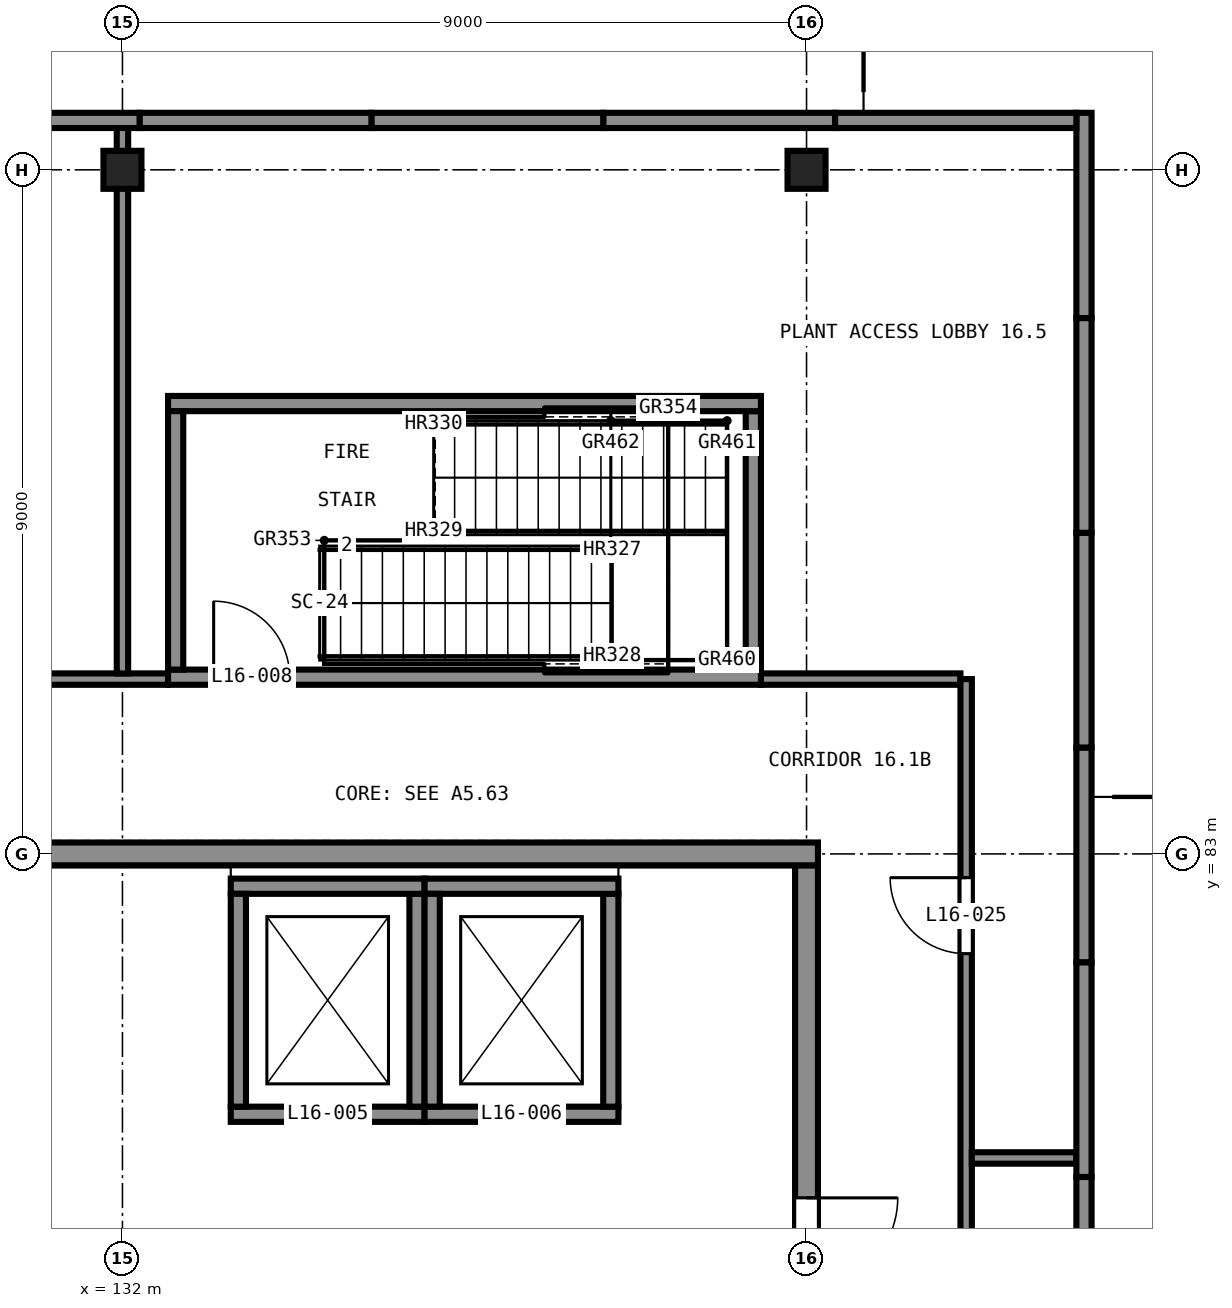
"""IFC4 building model, lengths in metres.
Left out: names, types, materials, properties, quantities, classifications, styles, units other than length and angle.
Written with IfcOpenShell. Run it as: python <this file> out.ifc"""

import sys

from ifc_helpers import new_model, si_unit, direction, frame, frame_2d, origin, origin_2d, place, context, subcontext, project, spatial, polyline, rectangle, outline, extrude, element, fill, save


model = new_model("IFC4")
c1 = context("Model", 3, precision=1e-05, world=origin(), true_north=direction((0.0, 1.0)))
c2 = subcontext(c1, "Body", "Model", "MODEL_VIEW")
j1 = project(units=[si_unit("LENGTHUNIT", "METRE"), si_unit("PLANEANGLEUNIT", "RADIAN")], contexts=[c1])
p1 = place(None, origin())
s1 = spatial("IfcSite", under=j1, at=p1, CompositionType="ELEMENT")
p2 = place(p1, origin())
s2 = spatial("IfcBuilding", under=s1, at=p2, CompositionType="ELEMENT")
p3 = place(p2, frame((0.0, 0.0, 65.5)))
s3 = spatial("IfcBuildingStorey", under=s2, at=p3, CompositionType="ELEMENT", Elevation=65.5)
for number, where, z_axis, x_axis in (
    (1, (132.0, 92.0, 0.0), (0.0, 0.0, 1.0), (1.0, 0.0, 0.0)),
    (2, (141.0, 92.0, 0.0), (0.0, 0.0, 1.0), (1.0, 0.0, 0.0)),
):
    element("IfcColumn", number, at=place(p3, frame(where, z_axis=z_axis, x_axis=x_axis)), inside=s3, PredefinedType="COLUMN", context=c2, shape_type="SweptSolid", body=[
        extrude(rectangle(XDim=0.5, YDim=0.5, at=origin_2d()), origin(), (0.0, 0.0, 1.0), 4.7),
    ])
p4 = place(p3, frame((141.0, 65.15, 0.0), z_axis=(0.0, 0.0, 1.0), x_axis=(0.0, 1.0, 0.0)))
e3 = element("IfcWall", 3, at=p4, inside=s3, PredefinedType="SHEAR", context=c2, shape_type="SweptSolid", body=[
    extrude(rectangle(XDim=17.7, YDim=0.3, at=frame_2d((8.85, 0.0))), origin(), (0.0, 0.0, 1.0), 4.7),
])
p5 = place(p4, frame((4.375, 0.0, 0.0)))
e4 = element("IfcOpeningElement", 4, at=p5, cuts=e3, PredefinedType="OPENING", context=c2, shape_type="SweptSolid", body=[
    extrude(rectangle(XDim=1.2, YDim=2.1, at=frame_2d((0.6, 1.05))), frame((0.0, 0.16, 0.0), z_axis=(0.0, -1.0, 0.0), x_axis=(1.0, 0.0, 0.0)), (0.0, 0.0, 1.0), 0.32),
])
p6 = place(p4, frame((12.125, 0.0, 0.0)))
e5 = element("IfcOpeningElement", 5, at=p6, cuts=e3, PredefinedType="OPENING", context=c2, shape_type="SweptSolid", body=[
    extrude(rectangle(XDim=1.2, YDim=2.1, at=frame_2d((0.6, 1.05))), frame((0.0, 0.16, 0.0), z_axis=(0.0, -1.0, 0.0), x_axis=(1.0, 0.0, 0.0)), (0.0, 0.0, 1.0), 0.32),
])
p7 = place(p3, frame((141.15, 83.0, 0.0), z_axis=(0.0, 0.0, 1.0), x_axis=(-1.0, 0.0, 0.0)))
e6 = element("IfcWall", 6, at=p7, inside=s3, PredefinedType="SHEAR", context=c2, shape_type="SweptSolid", body=[
    extrude(rectangle(XDim=18.3, YDim=0.3, at=frame_2d((9.15, 0.0))), origin(), (0.0, 0.0, 1.0), 4.7),
])
p8 = place(p3, frame((144.65, 75.8, 0.0), z_axis=(0.0, 0.0, 1.0), x_axis=(0.0, 1.0, 0.0)))
e7 = element("IfcWall", 7, at=p8, inside=s3, PredefinedType="SOLIDWALL", context=c2, shape_type="SweptSolid", body=[
    extrude(rectangle(XDim=2.95, YDim=0.2, at=frame_2d((1.475, 0.0))), origin(), (0.0, 0.0, 1.0), 4.7),
])
for number, where, z_axis, x_axis in (
    (8, (144.65, 78.75, 0.0), (0.0, 0.0, 1.0), (0.0, 1.0, 0.0)),
    (9, (144.65, 81.575, 0.0), (0.0, 0.0, 1.0), (0.0, 1.0, 0.0)),
):
    element("IfcWall", number, at=place(p3, frame(where, z_axis=z_axis, x_axis=x_axis)), inside=s3, PredefinedType="SOLIDWALL", context=c2, shape_type="SweptSolid", body=[
        extrude(rectangle(XDim=2.825, YDim=0.2, at=frame_2d((1.413, 0.0))), origin(), (0.0, 0.0, 1.0), 4.7),
    ])
p9 = place(p3, frame((144.65, 84.4, 0.0), z_axis=(0.0, 0.0, 1.0), x_axis=(0.0, 1.0, 0.0)))
e10 = element("IfcWall", 10, at=p9, inside=s3, PredefinedType="SOLIDWALL", context=c2, shape_type="SweptSolid", body=[
    extrude(rectangle(XDim=2.825, YDim=0.2, at=frame_2d((1.413, 0.0))), origin(), (0.0, 0.0, 1.0), 4.7),
])
p10 = place(p3, frame((144.65, 87.225, 0.0), z_axis=(0.0, 0.0, 1.0), x_axis=(0.0, 1.0, 0.0)))
e11 = element("IfcWall", 11, at=p10, inside=s3, PredefinedType="SOLIDWALL", context=c2, shape_type="SweptSolid", body=[
    extrude(rectangle(XDim=2.825, YDim=0.2, at=frame_2d((1.413, 0.0))), origin(), (0.0, 0.0, 1.0), 4.7),
])
p11 = place(p3, frame((144.65, 90.05, 0.0), z_axis=(0.0, 0.0, 1.0), x_axis=(0.0, 1.0, 0.0)))
e12 = element("IfcWall", 12, at=p11, inside=s3, PredefinedType="SOLIDWALL", context=c2, shape_type="SweptSolid", body=[
    extrude(rectangle(XDim=2.7, YDim=0.2, at=frame_2d((1.35, 0.0))), origin(), (0.0, 0.0, 1.0), 4.7),
])
p12 = place(p3, frame((144.55, 92.65, 0.0), z_axis=(0.0, 0.0, 1.0), x_axis=(-1.0, 0.0, 0.0)))
e13 = element("IfcWall", 13, at=p12, inside=s3, PredefinedType="SOLIDWALL", context=c2, shape_type="SweptSolid", body=[
    extrude(rectangle(XDim=3.175, YDim=0.2, at=frame_2d((1.587, 0.0))), origin(), (0.0, 0.0, 1.0), 4.7),
])
for number, where, z_axis, x_axis in (
    (14, (141.375, 92.65, 0.0), (0.0, 0.0, 1.0), (-1.0, 0.0, 0.0)),
    (15, (138.325, 92.65, 0.0), (0.0, 0.0, 1.0), (-1.0, 0.0, 0.0)),
):
    element("IfcWall", number, at=place(p3, frame(where, z_axis=z_axis, x_axis=x_axis)), inside=s3, PredefinedType="SOLIDWALL", context=c2, shape_type="SweptSolid", body=[
        extrude(rectangle(XDim=3.05, YDim=0.2, at=frame_2d((1.525, 0.0))), origin(), (0.0, 0.0, 1.0), 4.7),
    ])
p13 = place(p3, frame((135.275, 92.65, 0.0), z_axis=(0.0, 0.0, 1.0), x_axis=(-1.0, 0.0, 0.0)))
e16 = element("IfcWall", 16, at=p13, inside=s3, PredefinedType="SOLIDWALL", context=c2, shape_type="SweptSolid", body=[
    extrude(rectangle(XDim=3.05, YDim=0.2, at=frame_2d((1.525, 0.0))), origin(), (0.0, 0.0, 1.0), 4.7),
])
p14 = place(p3, frame((132.225, 92.65, 0.0), z_axis=(0.0, 0.0, 1.0), x_axis=(-1.0, 0.0, 0.0)))
e17 = element("IfcWall", 17, at=p14, inside=s3, PredefinedType="SOLIDWALL", context=c2, shape_type="SweptSolid", body=[
    extrude(rectangle(XDim=2.925, YDim=0.2, at=frame_2d((1.462, 0.0))), origin(), (0.0, 0.0, 1.0), 4.7),
])
p15 = place(p3, frame((133.425, 79.575, 0.0), z_axis=(0.0, 0.0, 1.0), x_axis=(1.0, 0.0, 0.0)))
e18 = element("IfcWall", 18, at=p15, inside=s3, PredefinedType="SHEAR", context=c2, shape_type="SweptSolid", body=[
    extrude(rectangle(XDim=2.55, YDim=0.2, at=frame_2d((1.275, 0.0))), origin(), (0.0, 0.0, 1.0), 4.7),
])
p16 = place(p15, frame((0.725, 0.0, 0.0)))
e19 = element("IfcOpeningElement", 19, at=p16, cuts=e18, PredefinedType="OPENING", context=c2, shape_type="SweptSolid", body=[
    extrude(rectangle(XDim=1.1, YDim=2.1, at=frame_2d((0.55, 1.05))), frame((0.0, 0.11, 0.0), z_axis=(0.0, -1.0, 0.0), x_axis=(1.0, 0.0, 0.0)), (0.0, 0.0, 1.0), 0.22),
])
p17 = place(p3, frame((135.875, 79.675, 0.0), z_axis=(0.0, 0.0, 1.0), x_axis=(0.0, 1.0, 0.0)))
e20 = element("IfcWall", 20, at=p17, inside=s3, PredefinedType="SHEAR", context=c2, shape_type="SweptSolid", body=[
    extrude(rectangle(XDim=2.8, YDim=0.2, at=frame_2d((1.4, 0.0))), origin(), (0.0, 0.0, 1.0), 4.7),
])
p18 = place(p3, frame((135.975, 82.575, 0.0), z_axis=(0.0, 0.0, 1.0), x_axis=(-1.0, 0.0, 0.0)))
e21 = element("IfcWall", 21, at=p18, inside=s3, PredefinedType="SHEAR", context=c2, shape_type="SweptSolid", body=[
    extrude(rectangle(XDim=2.55, YDim=0.2, at=frame_2d((1.275, 0.0))), origin(), (0.0, 0.0, 1.0), 4.7),
])
p19 = place(p3, frame((133.525, 82.475, 0.0), z_axis=(0.0, 0.0, 1.0), x_axis=(0.0, -1.0, 0.0)))
e22 = element("IfcWall", 22, at=p19, inside=s3, PredefinedType="SHEAR", context=c2, shape_type="SweptSolid", body=[
    extrude(rectangle(XDim=2.8, YDim=0.2, at=frame_2d((1.4, 0.0))), origin(), (0.0, 0.0, 1.0), 4.7),
])
p20 = place(p3, frame((135.975, 79.575, 0.0), z_axis=(0.0, 0.0, 1.0), x_axis=(1.0, 0.0, 0.0)))
e23 = element("IfcWall", 23, at=p20, inside=s3, PredefinedType="SHEAR", context=c2, shape_type="SweptSolid", body=[
    extrude(rectangle(XDim=2.55, YDim=0.2, at=frame_2d((1.275, 0.0))), origin(), (0.0, 0.0, 1.0), 4.7),
])
p21 = place(p20, frame((0.725, 0.0, 0.0)))
e24 = element("IfcOpeningElement", 24, at=p21, cuts=e23, PredefinedType="OPENING", context=c2, shape_type="SweptSolid", body=[
    extrude(rectangle(XDim=1.1, YDim=2.1, at=frame_2d((0.55, 1.05))), frame((0.0, 0.11, 0.0), z_axis=(0.0, -1.0, 0.0), x_axis=(1.0, 0.0, 0.0)), (0.0, 0.0, 1.0), 0.22),
])
p22 = place(p3, frame((138.425, 79.675, 0.0), z_axis=(0.0, 0.0, 1.0), x_axis=(0.0, 1.0, 0.0)))
e25 = element("IfcWall", 25, at=p22, inside=s3, PredefinedType="SHEAR", context=c2, shape_type="SweptSolid", body=[
    extrude(rectangle(XDim=2.8, YDim=0.2, at=frame_2d((1.4, 0.0))), origin(), (0.0, 0.0, 1.0), 4.7),
])
p23 = place(p3, frame((138.525, 82.575, 0.0), z_axis=(0.0, 0.0, 1.0), x_axis=(-1.0, 0.0, 0.0)))
e26 = element("IfcWall", 26, at=p23, inside=s3, PredefinedType="SHEAR", context=c2, shape_type="SweptSolid", body=[
    extrude(rectangle(XDim=2.55, YDim=0.2, at=frame_2d((1.275, 0.0))), origin(), (0.0, 0.0, 1.0), 4.7),
])
p24 = place(p3, frame((136.075, 82.475, 0.0), z_axis=(0.0, 0.0, 1.0), x_axis=(0.0, -1.0, 0.0)))
e27 = element("IfcWall", 27, at=p24, inside=s3, PredefinedType="SHEAR", context=c2, shape_type="SweptSolid", body=[
    extrude(rectangle(XDim=2.8, YDim=0.2, at=frame_2d((1.4, 0.0))), origin(), (0.0, 0.0, 1.0), 4.7),
])
p25 = place(p3, frame((132.6, 85.325, 0.0), z_axis=(0.0, 0.0, 1.0), x_axis=(1.0, 0.0, 0.0)))
e28 = element("IfcWall", 28, at=p25, inside=s3, PredefinedType="SHEAR", context=c2, shape_type="SweptSolid", body=[
    extrude(rectangle(XDim=7.8, YDim=0.2, at=frame_2d((3.9, 0.0))), origin(), (0.0, 0.0, 1.0), 4.7),
])
p26 = place(p25, frame((0.6, 0.0, 0.0)))
e29 = element("IfcOpeningElement", 29, at=p26, cuts=e28, PredefinedType="OPENING", context=c2, shape_type="SweptSolid", body=[
    extrude(rectangle(XDim=1.0, YDim=2.1, at=frame_2d((0.5, 1.05))), frame((0.0, 0.11, 0.0), z_axis=(0.0, -1.0, 0.0), x_axis=(1.0, 0.0, 0.0)), (0.0, 0.0, 1.0), 0.22),
])
p27 = place(p3, frame((140.3, 85.425, 0.0), z_axis=(0.0, 0.0, 1.0), x_axis=(0.0, 1.0, 0.0)))
e30 = element("IfcWall", 30, at=p27, inside=s3, PredefinedType="SHEAR", context=c2, shape_type="SweptSolid", body=[
    extrude(rectangle(XDim=3.4, YDim=0.2, at=frame_2d((1.7, 0.0))), origin(), (0.0, 0.0, 1.0), 4.7),
])
p28 = place(p3, frame((140.4, 88.925, 0.0), z_axis=(0.0, 0.0, 1.0), x_axis=(-1.0, 0.0, 0.0)))
e31 = element("IfcWall", 31, at=p28, inside=s3, PredefinedType="SHEAR", context=c2, shape_type="SweptSolid", body=[
    extrude(rectangle(XDim=7.8, YDim=0.2, at=frame_2d((3.9, 0.0))), origin(), (0.0, 0.0, 1.0), 4.7),
])
p29 = place(p3, frame((132.7, 88.825, 0.0), z_axis=(0.0, 0.0, 1.0), x_axis=(0.0, -1.0, 0.0)))
e32 = element("IfcWall", 32, at=p29, inside=s3, PredefinedType="SHEAR", context=c2, shape_type="SweptSolid", body=[
    extrude(rectangle(XDim=3.4, YDim=0.2, at=frame_2d((1.7, 0.0))), origin(), (0.0, 0.0, 1.0), 4.7),
])
p30 = place(p3, frame((132.6, 85.325, 5.0), z_axis=(0.0, 0.0, 1.0), x_axis=(1.0, 0.0, 0.0)))
e33 = element("IfcWall", 33, at=p30, inside=s3, PredefinedType="SHEAR", context=c2, shape_type="SweptSolid", body=[
    extrude(outline(polyline([(0.0, 0.0), (7.8, 0.0), (7.8, 3.591), (0.0, 3.591), (0.0, 0.0)])), frame((0.0, 0.1, 0.0), z_axis=(0.0, -1.0, 0.0), x_axis=(1.0, 0.0, 0.0)), (0.0, 0.0, 1.0), 0.2),
])
p31 = place(p3, frame((140.3, 85.425, 5.0), z_axis=(0.0, 0.0, 1.0), x_axis=(0.0, 1.0, 0.0)))
e34 = element("IfcWall", 34, at=p31, inside=s3, PredefinedType="SHEAR", context=c2, shape_type="SweptSolid", body=[
    extrude(outline(polyline([(0.0, 0.0), (3.4, 0.0), (3.4, 2.654), (0.0, 3.565), (0.0, 0.0)])), frame((0.0, 0.1, 0.0), z_axis=(0.0, -1.0, 0.0), x_axis=(1.0, 0.0, 0.0)), (0.0, 0.0, 1.0), 0.2),
])
p32 = place(p3, frame((140.4, 88.925, 5.0), z_axis=(0.0, 0.0, 1.0), x_axis=(-1.0, 0.0, 0.0)))
e35 = element("IfcWall", 35, at=p32, inside=s3, PredefinedType="SHEAR", context=c2, shape_type="SweptSolid", body=[
    extrude(outline(polyline([(0.0, 0.0), (7.8, 0.0), (7.8, 2.627), (0.0, 2.627), (0.0, 0.0)])), frame((0.0, 0.1, 0.0), z_axis=(0.0, -1.0, 0.0), x_axis=(1.0, 0.0, 0.0)), (0.0, 0.0, 1.0), 0.2),
])
p33 = place(p3, frame((132.7, 88.825, 5.0), z_axis=(0.0, 0.0, 1.0), x_axis=(0.0, -1.0, 0.0)))
e36 = element("IfcWall", 36, at=p33, inside=s3, PredefinedType="SHEAR", context=c2, shape_type="SweptSolid", body=[
    extrude(outline(polyline([(0.0, 0.0), (3.4, 0.0), (3.4, 3.565), (0.0, 2.654), (0.0, 0.0)])), frame((0.0, 0.1, 0.0), z_axis=(0.0, -1.0, 0.0), x_axis=(1.0, 0.0, 0.0)), (0.0, 0.0, 1.0), 0.2),
])
p34 = place(p33, frame((1.2, 0.0, 0.0)))
e37 = element("IfcOpeningElement", 37, at=p34, cuts=e36, PredefinedType="OPENING", context=c2, shape_type="SweptSolid", body=[
    extrude(rectangle(XDim=1.0, YDim=2.1, at=frame_2d((0.5, 1.05))), frame((0.0, 0.11, 0.0), z_axis=(0.0, -1.0, 0.0), x_axis=(1.0, 0.0, 0.0)), (0.0, 0.0, 1.0), 0.22),
])
p35 = place(p3, frame((122.7, 85.3, 0.0), z_axis=(0.0, 0.0, 1.0), x_axis=(1.0, 0.0, 0.0)))
e38 = element("IfcWall", 38, at=p35, inside=s3, PredefinedType="PARTITIONING", context=c2, shape_type="SweptSolid", body=[
    extrude(rectangle(XDim=9.9, YDim=0.15, at=frame_2d((4.95, 0.0))), origin(), (0.0, 0.0, 1.0), 4.7),
])
p36 = place(p3, frame((140.4, 85.3, 0.0), z_axis=(0.0, 0.0, 1.0), x_axis=(1.0, 0.0, 0.0)))
e39 = element("IfcWall", 39, at=p36, inside=s3, PredefinedType="PARTITIONING", context=c2, shape_type="SweptSolid", body=[
    extrude(rectangle(XDim=2.625, YDim=0.15, at=frame_2d((1.312, 0.0))), origin(), (0.0, 0.0, 1.0), 4.7),
])
p37 = place(p3, frame((143.1, 85.3, 0.0), z_axis=(0.0, 0.0, 1.0), x_axis=(0.0, -1.0, 0.0)))
e40 = element("IfcWall", 40, at=p37, inside=s3, PredefinedType="PARTITIONING", context=c2, shape_type="SweptSolid", body=[
    extrude(rectangle(XDim=22.6, YDim=0.15, at=frame_2d((11.3, 0.0))), origin(), (0.0, 0.0, 1.0), 4.7),
])
p38 = place(p37, frame((13.988, 0.0, 0.0)))
e41 = element("IfcOpeningElement", 41, at=p38, cuts=e40, PredefinedType="OPENING", context=c2, shape_type="SweptSolid", body=[
    extrude(rectangle(XDim=1.0, YDim=2.1, at=frame_2d((0.5, 1.05))), frame((0.0, 0.085, 0.0), z_axis=(0.0, -1.0, 0.0), x_axis=(1.0, 0.0, 0.0)), (0.0, 0.0, 1.0), 0.17),
])
p39 = place(p37, frame((2.613, 0.0, 0.0)))
e42 = element("IfcOpeningElement", 42, at=p39, cuts=e40, PredefinedType="OPENING", context=c2, shape_type="SweptSolid", body=[
    extrude(rectangle(XDim=1.0, YDim=2.1, at=frame_2d((0.5, 1.05))), frame((0.0, 0.085, 0.0), z_axis=(0.0, -1.0, 0.0), x_axis=(1.0, 0.0, 0.0)), (0.0, 0.0, 1.0), 0.17),
])
p40 = place(p3, frame((132.0, 85.374, 0.0), z_axis=(0.0, 0.0, 1.0), x_axis=(0.0, 1.0, 0.0)))
e43 = element("IfcWall", 43, at=p40, inside=s3, PredefinedType="PARTITIONING", context=c2, shape_type="SweptSolid", body=[
    extrude(rectangle(XDim=7.177, YDim=0.15, at=frame_2d((3.588, 0.0))), origin(), (0.0, 0.0, 1.0), 3.8),
])
p41 = place(p3, frame((143.174, 79.0, 0.0), z_axis=(0.0, 0.0, 1.0), x_axis=(1.0, 0.0, 0.0)))
e44 = element("IfcWall", 44, at=p41, inside=s3, PredefinedType="PARTITIONING", context=c2, shape_type="SweptSolid", body=[
    extrude(rectangle(XDim=1.377, YDim=0.15, at=frame_2d((0.688, 0.0))), origin(), (0.0, 0.0, 1.0), 4.7),
])
p42 = place(p16, origin())
e45 = element("IfcDoor", 45, at=p42, inside=s3, OperationType="SLIDING_TO_LEFT", PredefinedType="DOOR", context=c2, shape_type="SweptSolid", body=[
    extrude(rectangle(XDim=1.1, YDim=2.1, at=frame_2d((0.55, 1.05))), frame((0.0, 0.025, 0.0), z_axis=(0.0, -1.0, 0.0), x_axis=(1.0, 0.0, 0.0)), (0.0, 0.0, 1.0), 0.05),
])
fill(e19, e45)
p43 = place(p21, origin())
e46 = element("IfcDoor", 46, at=p43, inside=s3, OperationType="SLIDING_TO_LEFT", PredefinedType="DOOR", context=c2, shape_type="SweptSolid", body=[
    extrude(rectangle(XDim=1.1, YDim=2.1, at=frame_2d((0.55, 1.05))), frame((0.0, 0.025, 0.0), z_axis=(0.0, -1.0, 0.0), x_axis=(1.0, 0.0, 0.0)), (0.0, 0.0, 1.0), 0.05),
])
fill(e24, e46)
p44 = place(p26, origin())
e47 = element("IfcDoor", 47, at=p44, inside=s3, OperationType="SINGLE_SWING_RIGHT", PredefinedType="DOOR", context=c2, shape_type="SweptSolid", body=[
    extrude(rectangle(XDim=1.0, YDim=2.1, at=frame_2d((0.5, 1.05))), frame((0.0, 0.025, 0.0), z_axis=(0.0, -1.0, 0.0), x_axis=(1.0, 0.0, 0.0)), (0.0, 0.0, 1.0), 0.05),
])
fill(e29, e47)
p45 = place(p34, frame((1.0, 0.0, 0.0), z_axis=(0.0, 0.0, 1.0), x_axis=(-1.0, 0.0, 0.0)))
e48 = element("IfcDoor", 48, at=p45, inside=s3, OperationType="SINGLE_SWING_LEFT", PredefinedType="DOOR", context=c2, shape_type="SweptSolid", body=[
    extrude(rectangle(XDim=1.0, YDim=2.1, at=frame_2d((0.5, 1.05))), frame((0.0, 0.025, 0.0), z_axis=(0.0, -1.0, 0.0), x_axis=(1.0, 0.0, 0.0)), (0.0, 0.0, 1.0), 0.05),
])
fill(e37, e48)
p46 = place(p6, frame((1.2, 0.0, 0.0), z_axis=(0.0, 0.0, 1.0), x_axis=(-1.0, 0.0, 0.0)))
e49 = element("IfcDoor", 49, at=p46, inside=s3, OperationType="SINGLE_SWING_RIGHT", PredefinedType="DOOR", context=c2, shape_type="SweptSolid", body=[
    extrude(rectangle(XDim=1.2, YDim=2.1, at=frame_2d((0.6, 1.05))), frame((0.0, 0.025, 0.0), z_axis=(0.0, -1.0, 0.0), x_axis=(1.0, 0.0, 0.0)), (0.0, 0.0, 1.0), 0.05),
])
fill(e5, e49)
p47 = place(p39, frame((1.0, 0.0, 0.0), z_axis=(0.0, 0.0, 1.0), x_axis=(-1.0, 0.0, 0.0)))
e50 = element("IfcDoor", 50, at=p47, inside=s3, OperationType="SINGLE_SWING_LEFT", PredefinedType="DOOR", context=c2, shape_type="SweptSolid", body=[
    extrude(rectangle(XDim=1.0, YDim=2.1, at=frame_2d((0.5, 1.05))), frame((0.0, 0.025, 0.0), z_axis=(0.0, -1.0, 0.0), x_axis=(1.0, 0.0, 0.0)), (0.0, 0.0, 1.0), 0.05),
])
fill(e42, e50)
save(model, sys.argv[1])
